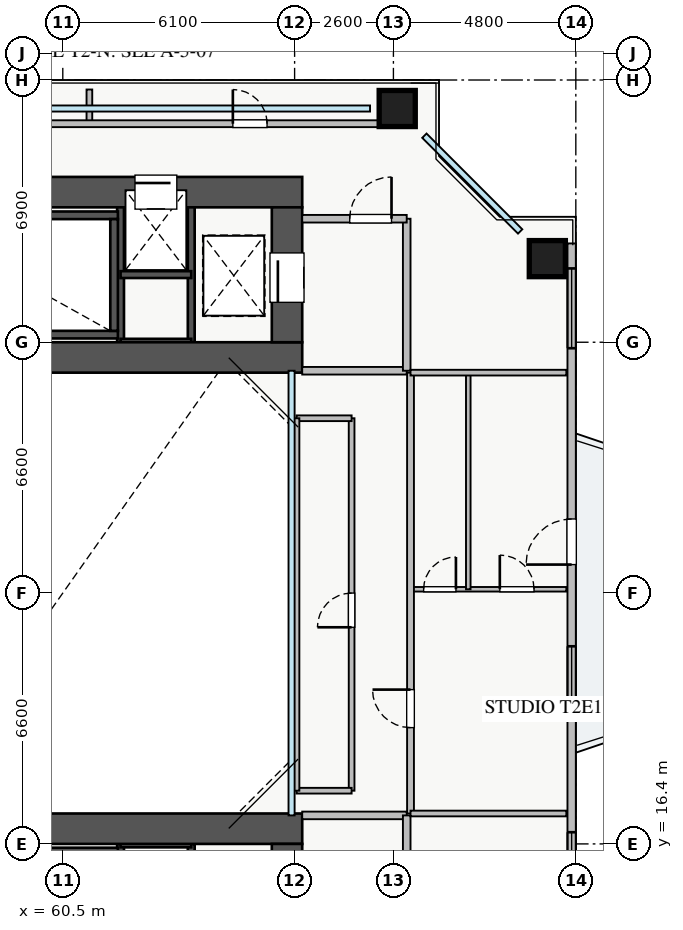
"""IFC4 building model, lengths in metres.
Left out: names, types, materials, properties, quantities, classifications, styles, units other than length and angle.
Written with IfcOpenShell. Run it as: python <this file> out.ifc"""

import sys

from ifc_helpers import new_model, si_unit, direction, frame, frame_2d, origin, origin_2d, place, context, subcontext, project, spatial, rectangle, extrude, source, transform, mapped, element, fill, save


model = new_model("IFC4")
c1 = context("Model", 3, precision=1e-05, world=origin(), true_north=direction((0.0, 1.0)))
c2 = subcontext(c1, "Body", "Model", "MODEL_VIEW")
j1 = project(units=[si_unit("LENGTHUNIT", "METRE"), si_unit("PLANEANGLEUNIT", "RADIAN")], contexts=[c1])
p1 = place(None, origin())
s1 = spatial("IfcSite", under=j1, at=p1, CompositionType="ELEMENT")
p2 = place(p1, origin())
s2 = spatial("IfcBuilding", under=s1, at=p2, CompositionType="ELEMENT")
p3 = place(p2, frame((0.0, 0.0, 42.5)))
s3 = spatial("IfcBuildingStorey", under=s2, at=p3, CompositionType="ELEMENT", Elevation=42.5)
for number, where, z_axis, x_axis in (
    (1, (62.02, 29.6, 0.0), (0.0, 0.0, 1.0), (0.0, 1.0, 0.0)),
    (2, (63.88, 29.6, 0.0), (0.0, 0.0, 1.0), (0.0, 1.0, 0.0)),
):
    element("IfcWall", number, at=place(p3, frame(where, z_axis=z_axis, x_axis=x_axis)), inside=s3, PredefinedType="SHEAR", context=c2, shape_type="SweptSolid", body=[
        extrude(rectangle(XDim=3.95, YDim=0.18, at=frame_2d((1.975, 0.0))), origin(), (0.0, 0.0, 1.0), 3.03),
    ])
for number, where, z_axis, x_axis in (
    (3, (62.02, 31.38, 0.0), (0.0, 0.0, 1.0), (1.0, 0.0, 0.0)),
    (4, (62.02, 29.6, 0.0), (0.0, 0.0, 1.0), (1.0, 0.0, 0.0)),
):
    element("IfcWall", number, at=place(p3, frame(where, z_axis=z_axis, x_axis=x_axis)), inside=s3, PredefinedType="SHEAR", context=c2, shape_type="SweptSolid", body=[
        extrude(rectangle(XDim=1.86, YDim=0.18, at=frame_2d((0.93, 0.0))), origin(), (0.0, 0.0, 1.0), 3.03),
    ])
for number, where, z_axis, x_axis in (
    (5, (62.02, 12.45, 0.0), (0.0, 0.0, 1.0), (0.0, 1.0, 0.0)),
    (6, (63.88, 12.45, 0.0), (0.0, 0.0, 1.0), (0.0, 1.0, 0.0)),
):
    element("IfcWall", number, at=place(p3, frame(where, z_axis=z_axis, x_axis=x_axis)), inside=s3, PredefinedType="SHEAR", context=c2, shape_type="SweptSolid", body=[
        extrude(rectangle(XDim=3.95, YDim=0.18, at=frame_2d((1.975, 0.0))), origin(), (0.0, 0.0, 1.0), 3.03),
    ])
p4 = place(p3, frame((62.02, 16.4, 0.0), z_axis=(0.0, 0.0, 1.0), x_axis=(1.0, 0.0, 0.0)))
e7 = element("IfcWall", 7, at=p4, inside=s3, PredefinedType="SHEAR", context=c2, shape_type="SweptSolid", body=[
    extrude(rectangle(XDim=1.86, YDim=0.18, at=frame_2d((0.93, 0.0))), origin(), (0.0, 0.0, 1.0), 3.03),
])
for number, where, z_axis, x_axis in (
    (8, (54.8, 29.8, 0.0), (0.0, 0.0, 1.0), (1.0, 0.0, 0.0)),
    (9, (54.8, 32.94, 0.0), (0.0, 0.0, 1.0), (1.0, 0.0, 0.0)),
):
    element("IfcWall", number, at=place(p3, frame(where, z_axis=z_axis, x_axis=x_axis)), inside=s3, PredefinedType="SHEAR", context=c2, shape_type="SweptSolid", body=[
        extrude(rectangle(XDim=7.15, YDim=0.2, at=frame_2d((3.575, 0.0))), origin(), (0.0, 0.0, 1.0), 3.25),
    ])
p5 = place(p3, frame((61.85, 29.9, 0.0), z_axis=(0.0, 0.0, 1.0), x_axis=(0.0, 1.0, 0.0)))
e10 = element("IfcWall", 10, at=p5, inside=s3, PredefinedType="SHEAR", context=c2, shape_type="SweptSolid", body=[
    extrude(rectangle(XDim=2.94, YDim=0.2, at=frame_2d((1.47, 0.0))), origin(), (0.0, 0.0, 1.0), 3.25),
])
p6 = place(p3, frame((54.8, 16.2, 0.0), z_axis=(0.0, 0.0, 1.0), x_axis=(1.0, 0.0, 0.0)))
e11 = element("IfcWall", 11, at=p6, inside=s3, PredefinedType="SHEAR", context=c2, shape_type="SweptSolid", body=[
    extrude(rectangle(XDim=7.15, YDim=0.2, at=frame_2d((3.575, 0.0))), origin(), (0.0, 0.0, 1.0), 3.25),
])
p7 = place(p3, frame((54.2, 29.2, 0.0), z_axis=(0.0, 0.0, 1.0), x_axis=(1.0, 0.0, 0.0)))
e12 = element("IfcWall", 12, at=p7, inside=s3, PredefinedType="SHEAR", context=c2, shape_type="SweptSolid", body=[
    extrude(rectangle(XDim=12.6, YDim=0.8, at=frame_2d((6.3, 0.0))), origin(), (0.0, 0.0, 1.0), 3.25),
])
p8 = place(p3, frame((54.2, 33.55, 0.0), z_axis=(0.0, 0.0, 1.0), x_axis=(1.0, 0.0, 0.0)))
e13 = element("IfcWall", 13, at=p8, inside=s3, PredefinedType="SHEAR", context=c2, shape_type="SweptSolid", body=[
    extrude(rectangle(XDim=12.6, YDim=0.8, at=frame_2d((6.3, 0.0))), origin(), (0.0, 0.0, 1.0), 3.25),
])
p9 = place(p8, frame((8.2, 0.0, 0.0)))
e14 = element("IfcOpeningElement", 14, at=p9, cuts=e13, PredefinedType="OPENING", context=c2, shape_type="SweptSolid", body=[
    extrude(rectangle(XDim=1.1, YDim=2.05, at=frame_2d((0.55, 1.025))), frame((0.0, 0.41, 0.0), z_axis=(0.0, -1.0, 0.0), x_axis=(1.0, 0.0, 0.0)), (0.0, 0.0, 1.0), 0.82),
])
p10 = place(p3, frame((66.4, 29.6, 0.0), z_axis=(0.0, 0.0, 1.0), x_axis=(0.0, 1.0, 0.0)))
e15 = element("IfcWall", 15, at=p10, inside=s3, PredefinedType="SHEAR", context=c2, shape_type="SweptSolid", body=[
    extrude(rectangle(XDim=3.55, YDim=0.8, at=frame_2d((1.775, 0.0))), origin(), (0.0, 0.0, 1.0), 3.25),
])
p11 = place(p10, frame((1.05, 0.0, 0.0)))
e16 = element("IfcOpeningElement", 16, at=p11, cuts=e15, PredefinedType="OPENING", context=c2, shape_type="SweptSolid", body=[
    extrude(rectangle(XDim=1.3, YDim=2.05, at=frame_2d((0.65, 1.025))), frame((0.0, 0.41, 0.0), z_axis=(0.0, -1.0, 0.0), x_axis=(1.0, 0.0, 0.0)), (0.0, 0.0, 1.0), 0.82),
])
p12 = place(p3, frame((54.2, 16.8, 0.0), z_axis=(0.0, 0.0, 1.0), x_axis=(1.0, 0.0, 0.0)))
e17 = element("IfcWall", 17, at=p12, inside=s3, PredefinedType="SHEAR", context=c2, shape_type="SweptSolid", body=[
    extrude(rectangle(XDim=12.6, YDim=0.8, at=frame_2d((6.3, 0.0))), origin(), (0.0, 0.0, 1.0), 3.25),
])
p13 = place(p3, frame((66.4, 12.85, 0.0), z_axis=(0.0, 0.0, 1.0), x_axis=(0.0, 1.0, 0.0)))
e18 = element("IfcWall", 18, at=p13, inside=s3, PredefinedType="SHEAR", context=c2, shape_type="SweptSolid", body=[
    extrude(rectangle(XDim=3.55, YDim=0.8, at=frame_2d((1.775, 0.0))), origin(), (0.0, 0.0, 1.0), 3.25),
])
p14 = place(p13, frame((1.05, 0.0, 0.0)))
e19 = element("IfcOpeningElement", 19, at=p14, cuts=e18, PredefinedType="OPENING", context=c2, shape_type="SweptSolid", body=[
    extrude(rectangle(XDim=1.3, YDim=2.05, at=frame_2d((0.65, 1.025))), frame((0.0, 0.41, 0.0), z_axis=(0.0, -1.0, 0.0), x_axis=(1.0, 0.0, 0.0)), (0.0, 0.0, 1.0), 0.82),
])
m1 = source(origin(), c2, "Body", "SweptSolid", [
    extrude(rectangle(XDim=0.95, YDim=0.95, at=origin_2d()), origin(), (0.0, 0.0, 1.0), 3.25),
])
for number, where, z_axis, x_axis in (
    (20, (73.25, 31.8, 0.0), (0.0, 0.0, 1.0), (1.0, 0.0, 0.0)),
    (21, (69.3, 35.75, 0.0), (0.0, 0.0, 1.0), (1.0, 0.0, 0.0)),
):
    element("IfcColumn", number, at=place(p3, frame(where, z_axis=z_axis, x_axis=x_axis)), inside=s3, PredefinedType="COLUMN", context=c2, shape_type="MappedRepresentation", body=[
        mapped(m1, transform((0.0, 0.0, 0.0), x_axis=(1.0, 0.0, 0.0), y_axis=(0.0, 1.0, 0.0), z_axis=(0.0, 0.0, 1.0), scale=1.0)),
    ])
p15 = place(p3, frame((73.89, 13.8, 0.0), z_axis=(0.0, 0.0, 1.0), x_axis=(0.0, 1.0, 0.0)))
e22 = element("IfcWall", 22, at=p15, inside=s3, PredefinedType="STANDARD", context=c2, shape_type="SweptSolid", body=[
    extrude(rectangle(XDim=18.4, YDim=0.22, at=frame_2d((9.2, 0.0))), origin(), (0.0, 0.0, 1.0), 2.57),
])
p16 = place(p15, frame((9.95, 0.0, 0.0)))
e23 = element("IfcOpeningElement", 23, at=p16, cuts=e22, PredefinedType="OPENING", context=c2, shape_type="SweptSolid", body=[
    extrude(rectangle(XDim=1.2, YDim=2.1, at=frame_2d((0.6, 1.05))), frame((0.0, 0.12, 0.0), z_axis=(0.0, -1.0, 0.0), x_axis=(1.0, 0.0, 0.0)), (0.0, 0.0, 1.0), 0.24),
])
p17 = place(p15, frame((0.508, 0.0, 0.9)))
e24 = element("IfcOpeningElement", 24, at=p17, cuts=e22, PredefinedType="OPENING", context=c2, shape_type="SweptSolid", body=[
    extrude(rectangle(XDim=2.4, YDim=1.5, at=frame_2d((1.2, 0.75))), frame((0.0, 0.12, 0.0), z_axis=(0.0, -1.0, 0.0), x_axis=(1.0, 0.0, 0.0)), (0.0, 0.0, 1.0), 0.24),
])
p18 = place(p15, frame((6.0, 0.0, 0.9)))
e25 = element("IfcOpeningElement", 25, at=p18, cuts=e22, PredefinedType="OPENING", context=c2, shape_type="SweptSolid", body=[
    extrude(rectangle(XDim=1.8, YDim=1.45, at=frame_2d((0.9, 0.725))), frame((0.0, 0.12, 0.0), z_axis=(0.0, -1.0, 0.0), x_axis=(1.0, 0.0, 0.0)), (0.0, 0.0, 1.0), 0.24),
])
p19 = place(p15, frame((15.643, 0.0, 0.9)))
e26 = element("IfcOpeningElement", 26, at=p19, cuts=e22, PredefinedType="OPENING", context=c2, shape_type="SweptSolid", body=[
    extrude(rectangle(XDim=2.1, YDim=1.5, at=frame_2d((1.05, 0.75))), frame((0.0, 0.12, 0.0), z_axis=(0.0, -1.0, 0.0), x_axis=(1.0, 0.0, 0.0)), (0.0, 0.0, 1.0), 0.24),
])
p20 = place(p3, frame((66.8, 28.85, 0.0), z_axis=(0.0, 0.0, 1.0), x_axis=(1.0, 0.0, 0.0)))
e27 = element("IfcWall", 27, at=p20, inside=s3, PredefinedType="PARTITIONING", context=c2, shape_type="SweptSolid", body=[
    extrude(rectangle(XDim=2.75, YDim=0.2, at=frame_2d((1.375, 0.0))), origin(), (0.0, 0.0, 1.0), 3.03),
])
p21 = place(p3, frame((69.55, 28.85, 0.0), z_axis=(0.0, 0.0, 1.0), x_axis=(0.0, 1.0, 0.0)))
e28 = element("IfcWall", 28, at=p21, inside=s3, PredefinedType="PARTITIONING", context=c2, shape_type="SweptSolid", body=[
    extrude(rectangle(XDim=4.0, YDim=0.2, at=frame_2d((2.0, 0.0))), origin(), (0.0, 0.0, 1.0), 2.575),
])
p22 = place(p3, frame((66.8, 32.85, 0.0), z_axis=(0.0, 0.0, 1.0), x_axis=(1.0, 0.0, 0.0)))
e29 = element("IfcWall", 29, at=p22, inside=s3, PredefinedType="PARTITIONING", context=c2, shape_type="SweptSolid", body=[
    extrude(rectangle(XDim=2.75, YDim=0.2, at=frame_2d((1.375, 0.0))), origin(), (0.0, 0.0, 1.0), 3.03),
])
p23 = place(p22, frame((1.25, 0.0, 0.0)))
e30 = element("IfcOpeningElement", 30, at=p23, cuts=e29, PredefinedType="OPENING", context=c2, shape_type="SweptSolid", body=[
    extrude(rectangle(XDim=1.1, YDim=2.05, at=frame_2d((0.55, 1.025))), frame((0.0, 0.11, 0.0), z_axis=(0.0, -1.0, 0.0), x_axis=(1.0, 0.0, 0.0)), (0.0, 0.0, 1.0), 0.22),
])
p24 = place(p3, frame((66.8, 17.15, 0.0), z_axis=(0.0, 0.0, 1.0), x_axis=(1.0, 0.0, 0.0)))
e31 = element("IfcWall", 31, at=p24, inside=s3, PredefinedType="PARTITIONING", context=c2, shape_type="SweptSolid", body=[
    extrude(rectangle(XDim=2.75, YDim=0.2, at=frame_2d((1.375, 0.0))), origin(), (0.0, 0.0, 1.0), 3.03),
])
p25 = place(p3, frame((69.55, 13.15, 0.0), z_axis=(0.0, 0.0, 1.0), x_axis=(0.0, 1.0, 0.0)))
e32 = element("IfcWall", 32, at=p25, inside=s3, PredefinedType="PARTITIONING", context=c2, shape_type="SweptSolid", body=[
    extrude(rectangle(XDim=4.0, YDim=0.2, at=frame_2d((2.0, 0.0))), origin(), (0.0, 0.0, 1.0), 2.575),
])
p26 = place(p3, frame((69.65, 23.1, 0.0), z_axis=(0.0, 0.0, 1.0), x_axis=(1.0, 0.0, 0.0)))
e33 = element("IfcWall", 33, at=p26, inside=s3, PredefinedType="PLUMBINGWALL", context=c2, shape_type="SweptSolid", body=[
    extrude(rectangle(XDim=4.1, YDim=0.12, at=frame_2d((2.05, 0.0))), origin(), (0.0, 0.0, 1.0), 2.731),
])
p27 = place(p26, frame((0.345, 0.0, 0.0)))
e34 = element("IfcOpeningElement", 34, at=p27, cuts=e33, PredefinedType="OPENING", context=c2, shape_type="SweptSolid", body=[
    extrude(rectangle(XDim=0.85, YDim=2.05, at=frame_2d((0.425, 1.025))), frame((0.0, 0.07, 0.0), z_axis=(0.0, -1.0, 0.0), x_axis=(1.0, 0.0, 0.0)), (0.0, 0.0, 1.0), 0.14),
])
p28 = place(p26, frame((2.35, 0.0, 0.0)))
e35 = element("IfcOpeningElement", 35, at=p28, cuts=e33, PredefinedType="OPENING", context=c2, shape_type="SweptSolid", body=[
    extrude(rectangle(XDim=0.9, YDim=2.05, at=frame_2d((0.45, 1.025))), frame((0.0, 0.07, 0.0), z_axis=(0.0, -1.0, 0.0), x_axis=(1.0, 0.0, 0.0)), (0.0, 0.0, 1.0), 0.14),
])
p29 = place(p3, frame((71.17, 23.1, 0.0), z_axis=(0.0, 0.0, 1.0), x_axis=(0.0, 1.0, 0.0)))
e36 = element("IfcWall", 36, at=p29, inside=s3, PredefinedType="PLUMBINGWALL", context=c2, shape_type="SweptSolid", body=[
    extrude(rectangle(XDim=5.7, YDim=0.12, at=frame_2d((2.85, 0.0))), origin(), (0.0, 0.0, 1.0), 3.03),
])
p30 = place(p3, frame((69.65, 17.2, 0.0), z_axis=(0.0, 0.0, 1.0), x_axis=(0.0, 1.0, 0.0)))
e37 = element("IfcWall", 37, at=p30, inside=s3, PredefinedType="PARTITIONING", context=c2, shape_type="SweptSolid", body=[
    extrude(rectangle(XDim=11.6, YDim=0.18, at=frame_2d((5.8, 0.0))), origin(), (0.0, 0.0, 1.0), 3.03),
])
p31 = place(p30, frame((2.26, 0.0, 0.0)))
e38 = element("IfcOpeningElement", 38, at=p31, cuts=e37, PredefinedType="OPENING", context=c2, shape_type="SweptSolid", body=[
    extrude(rectangle(XDim=1.0, YDim=2.05, at=frame_2d((0.5, 1.025))), frame((0.0, 0.1, 0.0), z_axis=(0.0, -1.0, 0.0), x_axis=(1.0, 0.0, 0.0)), (0.0, 0.0, 1.0), 0.2),
])
for number, where, z_axis, x_axis in (
    (39, (69.65, 17.2, 0.0), (0.0, 0.0, 1.0), (1.0, 0.0, 0.0)),
    (40, (69.65, 28.8, 0.0), (0.0, 0.0, 1.0), (1.0, 0.0, 0.0)),
):
    element("IfcWall", number, at=place(p3, frame(where, z_axis=z_axis, x_axis=x_axis)), inside=s3, PredefinedType="PARTITIONING", context=c2, shape_type="SweptSolid", body=[
        extrude(rectangle(XDim=4.1, YDim=0.15, at=frame_2d((2.05, 0.0))), origin(), (0.0, 0.0, 1.0), 3.03),
    ])
p32 = place(p3, frame((68.1, 17.8, 0.0), z_axis=(0.0, 0.0, 1.0), x_axis=(0.0, 1.0, 0.0)))
e41 = element("IfcWall", 41, at=p32, inside=s3, PredefinedType="PARTITIONING", context=c2, shape_type="SweptSolid", body=[
    extrude(rectangle(XDim=9.8, YDim=0.15, at=frame_2d((4.9, 0.0))), origin(), (0.0, 0.0, 1.0), 3.03),
])
p33 = place(p32, frame((4.3, 0.0, 0.0)))
e42 = element("IfcOpeningElement", 42, at=p33, cuts=e41, PredefinedType="OPENING", context=c2, shape_type="SweptSolid", body=[
    extrude(rectangle(XDim=0.9, YDim=2.05, at=frame_2d((0.45, 1.025))), frame((0.0, 0.085, 0.0), z_axis=(0.0, -1.0, 0.0), x_axis=(1.0, 0.0, 0.0)), (0.0, 0.0, 1.0), 0.17),
])
p34 = place(p3, frame((66.65, 27.6, 0.0), z_axis=(0.0, 0.0, 1.0), x_axis=(1.0, 0.0, 0.0)))
e43 = element("IfcWall", 43, at=p34, inside=s3, PredefinedType="PARTITIONING", context=c2, shape_type="SweptSolid", body=[
    extrude(rectangle(XDim=1.45, YDim=0.15, at=frame_2d((0.725, 0.0))), origin(), (0.0, 0.0, 1.0), 2.731),
])
p35 = place(p3, frame((66.65, 17.8, 0.0), z_axis=(0.0, 0.0, 1.0), x_axis=(1.0, 0.0, 0.0)))
e44 = element("IfcWall", 44, at=p35, inside=s3, PredefinedType="PARTITIONING", context=c2, shape_type="SweptSolid", body=[
    extrude(rectangle(XDim=1.45, YDim=0.15, at=frame_2d((0.725, 0.0))), origin(), (0.0, 0.0, 1.0), 3.03),
])
p36 = place(p3, frame((66.65, 17.8, 0.0), z_axis=(0.0, 0.0, 1.0), x_axis=(0.0, 1.0, 0.0)))
e45 = element("IfcWall", 45, at=p36, inside=s3, PredefinedType="PARTITIONING", context=c2, shape_type="SweptSolid", body=[
    extrude(rectangle(XDim=9.8, YDim=0.15, at=frame_2d((4.9, 0.0))), origin(), (0.0, 0.0, 1.0), 2.625),
])
for number, where, z_axis, x_axis in (
    (46, (61.2, 35.35, 0.0), (0.0, 0.0, 1.0), (0.0, 1.0, 0.0)),
    (47, (69.65, 35.35, 0.0), (0.0, 0.0, 1.0), (0.0, 1.0, 0.0)),
):
    element("IfcWall", number, at=place(p3, frame(where, z_axis=z_axis, x_axis=x_axis)), inside=s3, PredefinedType="PARTITIONING", context=c2, shape_type="SweptSolid", body=[
        extrude(rectangle(XDim=0.9, YDim=0.15, at=frame_2d((0.45, 0.0))), origin(), (0.0, 0.0, 1.0), 3.03),
    ])
p37 = place(p3, frame((52.65, 35.35, 0.0), z_axis=(0.0, 0.0, 1.0), x_axis=(1.0, 0.0, 0.0)))
e48 = element("IfcWall", 48, at=p37, inside=s3, PredefinedType="PARTITIONING", context=c2, shape_type="SweptSolid", body=[
    extrude(rectangle(XDim=17.0, YDim=0.18, at=frame_2d((8.5, 0.0))), origin(), (0.0, 0.0, 1.0), 3.03),
])
p38 = place(p37, frame((3.825, 0.0, 0.0)))
e49 = element("IfcOpeningElement", 49, at=p38, cuts=e48, PredefinedType="OPENING", context=c2, shape_type="SweptSolid", body=[
    extrude(rectangle(XDim=0.9, YDim=2.05, at=frame_2d((0.45, 1.025))), frame((0.0, 0.1, 0.0), z_axis=(0.0, -1.0, 0.0), x_axis=(1.0, 0.0, 0.0)), (0.0, 0.0, 1.0), 0.2),
])
p39 = place(p37, frame((12.325, 0.0, 0.0)))
e50 = element("IfcOpeningElement", 50, at=p39, cuts=e48, PredefinedType="OPENING", context=c2, shape_type="SweptSolid", body=[
    extrude(rectangle(XDim=0.9, YDim=2.05, at=frame_2d((0.45, 1.025))), frame((0.0, 0.1, 0.0), z_axis=(0.0, -1.0, 0.0), x_axis=(1.0, 0.0, 0.0)), (0.0, 0.0, 1.0), 0.2),
])
m2 = source(origin(), c2, "Body", "SweptSolid", [
    extrude(rectangle(XDim=1.2, YDim=2.1, at=frame_2d((0.6, 1.05))), frame((0.0, 0.025, 0.0), z_axis=(0.0, -1.0, 0.0), x_axis=(1.0, 0.0, 0.0)), (0.0, 0.0, 1.0), 0.05),
])
p40 = place(p16, origin())
e51 = element("IfcDoor", 51, at=p40, inside=s3, OperationType="SINGLE_SWING_LEFT", PredefinedType="DOOR", context=c2, shape_type="MappedRepresentation", body=[
    mapped(m2, transform((0.0, 0.0, 0.0), x_axis=(1.0, 0.0, 0.0), y_axis=(0.0, 1.0, 0.0), z_axis=(0.0, 0.0, 1.0), scale=1.0)),
])
fill(e23, e51)
m3 = source(origin(), c2, "Body", "SweptSolid", [
    extrude(rectangle(XDim=2.4, YDim=1.5, at=frame_2d((1.2, 0.75))), frame((0.0, 0.03, 0.0), z_axis=(0.0, -1.0, 0.0), x_axis=(1.0, 0.0, 0.0)), (0.0, 0.0, 1.0), 0.06),
])
p41 = place(p17, origin())
e52 = element("IfcWindow", 52, at=p41, inside=s3, PartitioningType="TRIPLE_PANEL_VERTICAL", PredefinedType="WINDOW", context=c2, shape_type="MappedRepresentation", body=[
    mapped(m3, transform((0.0, 0.0, 0.0), x_axis=(1.0, 0.0, 0.0), y_axis=(0.0, 1.0, 0.0), z_axis=(0.0, 0.0, 1.0), scale=1.0)),
])
fill(e24, e52)
m4 = source(origin(), c2, "Body", "SweptSolid", [
    extrude(rectangle(XDim=1.8, YDim=1.45, at=frame_2d((0.9, 0.725))), frame((0.0, 0.03, 0.0), z_axis=(0.0, -1.0, 0.0), x_axis=(1.0, 0.0, 0.0)), (0.0, 0.0, 1.0), 0.06),
])
p42 = place(p18, origin())
e53 = element("IfcWindow", 53, at=p42, inside=s3, PartitioningType="DOUBLE_PANEL_VERTICAL", PredefinedType="WINDOW", context=c2, shape_type="MappedRepresentation", body=[
    mapped(m4, transform((0.0, 0.0, 0.0), x_axis=(1.0, 0.0, 0.0), y_axis=(0.0, 1.0, 0.0), z_axis=(0.0, 0.0, 1.0), scale=1.0)),
])
fill(e25, e53)
m5 = source(origin(), c2, "Body", "SweptSolid", [
    extrude(rectangle(XDim=2.1, YDim=1.5, at=frame_2d((1.05, 0.75))), frame((0.0, 0.03, 0.0), z_axis=(0.0, -1.0, 0.0), x_axis=(1.0, 0.0, 0.0)), (0.0, 0.0, 1.0), 0.06),
])
p43 = place(p19, origin())
e54 = element("IfcWindow", 54, at=p43, inside=s3, PartitioningType="TRIPLE_PANEL_VERTICAL", PredefinedType="WINDOW", context=c2, shape_type="MappedRepresentation", body=[
    mapped(m5, transform((0.0, 0.0, 0.0), x_axis=(1.0, 0.0, 0.0), y_axis=(0.0, 1.0, 0.0), z_axis=(0.0, 0.0, 1.0), scale=1.0)),
])
fill(e26, e54)
m6 = source(origin(), c2, "Body", "SweptSolid", [
    extrude(rectangle(XDim=1.3, YDim=2.05, at=frame_2d((0.65, 1.025))), frame((0.0, 0.025, 0.0), z_axis=(0.0, -1.0, 0.0), x_axis=(1.0, 0.0, 0.0)), (0.0, 0.0, 1.0), 0.05),
])
p44 = place(p11, origin())
e55 = element("IfcDoor", 55, at=p44, inside=s3, OperationType="SLIDING_TO_LEFT", PredefinedType="DOOR", context=c2, shape_type="MappedRepresentation", body=[
    mapped(m6, transform((0.0, 0.0, 0.0), x_axis=(1.0, 0.0, 0.0), y_axis=(0.0, 1.0, 0.0), z_axis=(0.0, 0.0, 1.0), scale=1.0)),
])
fill(e16, e55)
m7 = source(origin(), c2, "Body", "SweptSolid", [
    extrude(rectangle(XDim=1.1, YDim=2.05, at=frame_2d((0.55, 1.025))), frame((0.0, 0.025, 0.0), z_axis=(0.0, -1.0, 0.0), x_axis=(1.0, 0.0, 0.0)), (0.0, 0.0, 1.0), 0.05),
])
p45 = place(p9, origin())
e56 = element("IfcDoor", 56, at=p45, inside=s3, OperationType="SLIDING_TO_LEFT", PredefinedType="DOOR", context=c2, shape_type="MappedRepresentation", body=[
    mapped(m7, transform((0.0, 0.0, 0.0), x_axis=(1.0, 0.0, 0.0), y_axis=(0.0, 1.0, 0.0), z_axis=(0.0, 0.0, 1.0), scale=1.0)),
])
fill(e14, e56)
p46 = place(p23, origin())
e57 = element("IfcDoor", 57, at=p46, inside=s3, OperationType="SINGLE_SWING_RIGHT", PredefinedType="DOOR", context=c2, shape_type="MappedRepresentation", body=[
    mapped(m7, transform((0.0, 0.0, 0.0), x_axis=(1.0, 0.0, 0.0), y_axis=(0.0, 1.0, 0.0), z_axis=(0.0, 0.0, 1.0), scale=1.0)),
])
fill(e30, e57)
m8 = source(origin(), c2, "Body", "SweptSolid", [
    extrude(rectangle(XDim=0.85, YDim=2.05, at=frame_2d((0.425, 1.025))), frame((0.0, 0.025, 0.0), z_axis=(0.0, -1.0, 0.0), x_axis=(1.0, 0.0, 0.0)), (0.0, 0.0, 1.0), 0.05),
])
p47 = place(p27, origin())
e58 = element("IfcDoor", 58, at=p47, inside=s3, OperationType="SINGLE_SWING_RIGHT", PredefinedType="DOOR", context=c2, shape_type="MappedRepresentation", body=[
    mapped(m8, transform((0.0, 0.0, 0.0), x_axis=(1.0, 0.0, 0.0), y_axis=(0.0, 1.0, 0.0), z_axis=(0.0, 0.0, 1.0), scale=1.0)),
])
fill(e34, e58)
m9 = source(origin(), c2, "Body", "SweptSolid", [
    extrude(rectangle(XDim=0.9, YDim=2.05, at=frame_2d((0.45, 1.025))), frame((0.0, 0.025, 0.0), z_axis=(0.0, -1.0, 0.0), x_axis=(1.0, 0.0, 0.0)), (0.0, 0.0, 1.0), 0.05),
])
p48 = place(p28, origin())
e59 = element("IfcDoor", 59, at=p48, inside=s3, OperationType="SINGLE_SWING_LEFT", PredefinedType="DOOR", context=c2, shape_type="MappedRepresentation", body=[
    mapped(m9, transform((0.0, 0.0, 0.0), x_axis=(1.0, 0.0, 0.0), y_axis=(0.0, 1.0, 0.0), z_axis=(0.0, 0.0, 1.0), scale=1.0)),
])
fill(e35, e59)
m10 = source(origin(), c2, "Body", "SweptSolid", [
    extrude(rectangle(XDim=1.0, YDim=2.05, at=frame_2d((0.5, 1.025))), frame((0.0, 0.025, 0.0), z_axis=(0.0, -1.0, 0.0), x_axis=(1.0, 0.0, 0.0)), (0.0, 0.0, 1.0), 0.05),
])
p49 = place(p31, origin())
e60 = element("IfcDoor", 60, at=p49, inside=s3, OperationType="SINGLE_SWING_RIGHT", PredefinedType="DOOR", context=c2, shape_type="MappedRepresentation", body=[
    mapped(m10, transform((0.0, 0.0, 0.0), x_axis=(1.0, 0.0, 0.0), y_axis=(0.0, 1.0, 0.0), z_axis=(0.0, 0.0, 1.0), scale=1.0)),
])
fill(e38, e60)
p50 = place(p33, origin())
e61 = element("IfcDoor", 61, at=p50, inside=s3, OperationType="SINGLE_SWING_LEFT", PredefinedType="DOOR", context=c2, shape_type="MappedRepresentation", body=[
    mapped(m9, transform((0.0, 0.0, 0.0), x_axis=(1.0, 0.0, 0.0), y_axis=(0.0, 1.0, 0.0), z_axis=(0.0, 0.0, 1.0), scale=1.0)),
])
fill(e42, e61)
p51 = place(p39, origin())
e62 = element("IfcDoor", 62, at=p51, inside=s3, OperationType="SINGLE_SWING_LEFT", PredefinedType="DOOR", context=c2, shape_type="MappedRepresentation", body=[
    mapped(m9, transform((0.0, 0.0, 0.0), x_axis=(1.0, 0.0, 0.0), y_axis=(0.0, 1.0, 0.0), z_axis=(0.0, 0.0, 1.0), scale=1.0)),
])
fill(e50, e62)
save(model, sys.argv[1])
